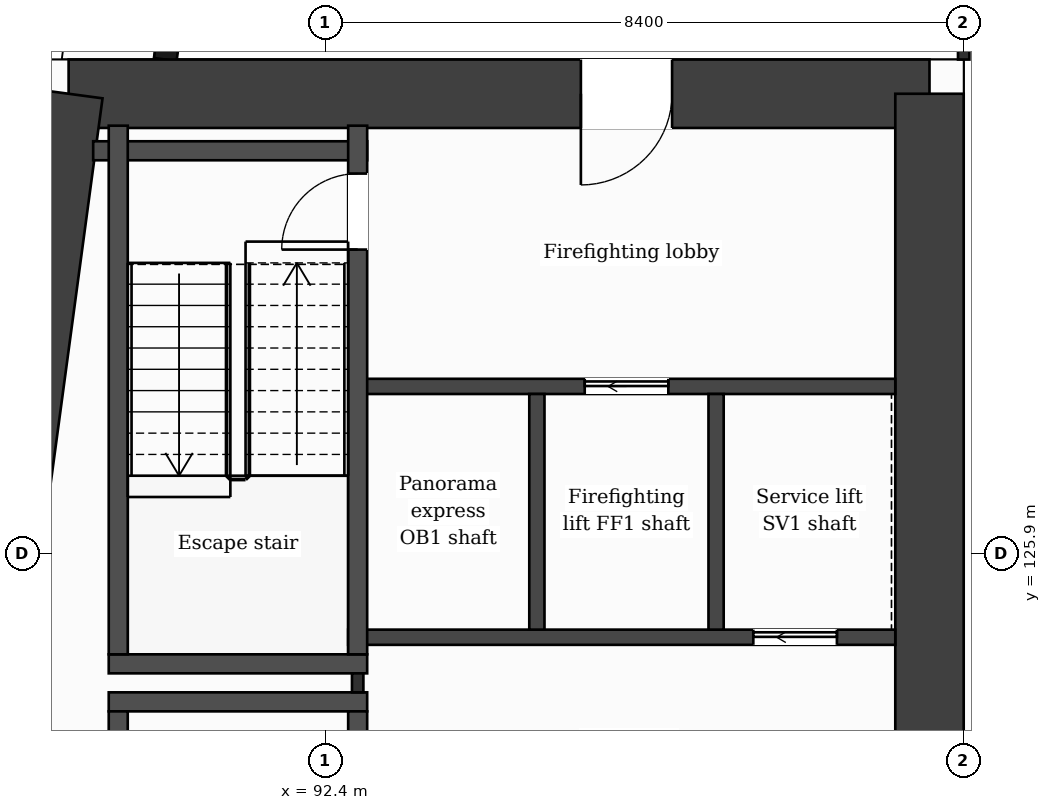
"""IFC4 building model, lengths in metres.
Left out: names, types, materials, properties, quantities, classifications, styles, units other than length and angle.
Written with IfcOpenShell. Run it as: python <this file> out.ifc"""

import sys

from ifc_helpers import new_model, si_unit, direction, frame, frame_2d, origin, place, context, subcontext, project, spatial, rectangle, extrude, element, fill, save


model = new_model("IFC4")
c1 = context("Model", 3, precision=1e-05, world=origin(), true_north=direction((0.0, 1.0)))
c2 = subcontext(c1, "Body", "Model", "MODEL_VIEW")
j1 = project(units=[si_unit("LENGTHUNIT", "METRE"), si_unit("PLANEANGLEUNIT", "RADIAN")], contexts=[c1])
p1 = place(None, origin())
s1 = spatial("IfcSite", under=j1, at=p1, CompositionType="ELEMENT")
p2 = place(p1, origin())
s2 = spatial("IfcBuilding", under=s1, at=p2, CompositionType="ELEMENT")
p3 = place(p2, frame((0.0, 0.0, 162.6)))
s3 = spatial("IfcBuildingStorey", under=s2, at=p3, CompositionType="ELEMENT", Elevation=162.6)
p4 = place(p3, frame((89.024, 131.95, 0.0), z_axis=(0.0, 0.0, 1.0), x_axis=(1.0, 0.0, 0.0)))
e1 = element("IfcWall", 1, at=p4, inside=s3, PredefinedType="SHEAR", context=c2, shape_type="SweptSolid", body=[
    extrude(rectangle(XDim=11.326, YDim=0.9, at=frame_2d((5.663, 0.0))), origin(), (0.0, 0.0, 1.0), 3.7),
])
p5 = place(p4, frame((6.739, 0.0, 0.0)))
e2 = element("IfcOpeningElement", 2, at=p5, cuts=e1, PredefinedType="OPENING", context=c2, shape_type="SweptSolid", body=[
    extrude(rectangle(XDim=1.2, YDim=2.1, at=frame_2d((0.6, 1.05))), frame((0.0, 0.46, 0.0), z_axis=(0.0, -1.0, 0.0), x_axis=(1.0, 0.0, 0.0)), (0.0, 0.0, 1.0), 0.92),
])
p6 = place(p3, frame((100.35, 131.95, 0.0), z_axis=(0.0, 0.0, 1.0), x_axis=(0.0, -1.0, 0.0)))
e3 = element("IfcWall", 3, at=p6, inside=s3, PredefinedType="SHEAR", context=c2, shape_type="SweptSolid", body=[
    extrude(rectangle(XDim=21.1, YDim=0.9, at=frame_2d((10.55, 0.0))), origin(), (0.0, 0.0, 1.0), 3.7),
])
p7 = place(p3, frame((86.184, 110.85, 0.0), z_axis=(0.0, 0.0, 1.0), x_axis=(0.133410495943, 0.991060865725, 0.0)))
e4 = element("IfcWall", 4, at=p7, inside=s3, PredefinedType="SHEAR", context=c2, shape_type="SweptSolid", body=[
    extrude(rectangle(XDim=21.29, YDim=0.9, at=frame_2d((10.645, 0.0))), origin(), (0.0, 0.0, 1.0), 3.7),
])
p8 = place(p3, frame((91.177, 138.95, 0.0), z_axis=(0.0, 0.0, 1.0), x_axis=(-0.133426664613, -0.991058689065, 0.0)))
e5 = element("IfcWall", 5, at=p8, inside=s3, PredefinedType="SOLIDWALL", context=c2, shape_type="SweptSolid", body=[
    extrude(rectangle(XDim=6.609, YDim=0.3, at=frame_2d((3.305, 0.0))), origin(), (0.0, 0.0, 1.0), 3.38),
])
p9 = place(p8, frame((1.039, 0.0, 0.9)))
e6 = element("IfcOpeningElement", 6, at=p9, cuts=e5, PredefinedType="OPENING", context=c2, shape_type="SweptSolid", body=[
    extrude(rectangle(XDim=1.2, YDim=2.1, at=frame_2d((0.6, 1.05))), frame((0.0, 0.16, 0.0), z_axis=(0.0, -1.0, 0.0), x_axis=(1.0, 0.0, 0.0)), (0.0, 0.0, 1.0), 0.32),
])
p10 = place(p8, frame((4.294, 0.0, 0.0)))
e7 = element("IfcOpeningElement", 7, at=p10, cuts=e5, PredefinedType="OPENING", context=c2, shape_type="SweptSolid", body=[
    extrude(rectangle(XDim=1.2, YDim=2.4, at=frame_2d((0.6, 1.2))), frame((0.0, 0.16, 0.0), z_axis=(0.0, -1.0, 0.0), x_axis=(1.0, 0.0, 0.0)), (0.0, 0.0, 1.0), 0.32),
])
for number, where, z_axis, x_axis in (
    (8, (89.552, 123.95, 0.0), (0.0, 0.0, 1.0), (1.0, 0.0, 0.0)),
    (9, (89.552, 124.45, 0.0), (0.0, 0.0, 1.0), (1.0, 0.0, 0.0)),
):
    element("IfcWall", number, at=place(p3, frame(where, z_axis=z_axis, x_axis=x_axis)), inside=s3, PredefinedType="PARTITIONING", context=c2, shape_type="SweptSolid", body=[
        extrude(rectangle(XDim=3.4, YDim=0.25, at=frame_2d((1.7, 0.0))), origin(), (0.0, 0.0, 1.0), 3.38),
    ])
p11 = place(p3, frame((92.702, 124.8, 0.0), z_axis=(0.0, 0.0, 1.0), x_axis=(1.0, 0.0, 0.0)))
e10 = element("IfcWall", 10, at=p11, inside=s3, PredefinedType="PARTITIONING", context=c2, shape_type="SweptSolid", body=[
    extrude(rectangle(XDim=7.198, YDim=0.2, at=frame_2d((3.599, 0.0))), origin(), (0.0, 0.0, 1.0), 3.38),
])
p12 = place(p11, frame((5.33, 0.0, 0.0)))
e11 = element("IfcOpeningElement", 11, at=p12, cuts=e10, PredefinedType="OPENING", context=c2, shape_type="SweptSolid", body=[
    extrude(rectangle(XDim=1.1, YDim=2.1, at=frame_2d((0.55, 1.05))), frame((0.0, 0.11, 0.0), z_axis=(0.0, -1.0, 0.0), x_axis=(1.0, 0.0, 0.0)), (0.0, 0.0, 1.0), 0.22),
])
p13 = place(p3, frame((92.827, 128.1, 0.0), z_axis=(0.0, 0.0, 1.0), x_axis=(1.0, 0.0, 0.0)))
e12 = element("IfcWall", 12, at=p13, inside=s3, PredefinedType="PARTITIONING", context=c2, shape_type="SweptSolid", body=[
    extrude(rectangle(XDim=7.073, YDim=0.2, at=frame_2d((3.537, 0.0))), origin(), (0.0, 0.0, 1.0), 3.38),
])
p14 = place(p13, frame((2.987, 0.0, 0.0)))
e13 = element("IfcOpeningElement", 13, at=p14, cuts=e12, PredefinedType="OPENING", context=c2, shape_type="SweptSolid", body=[
    extrude(rectangle(XDim=1.1, YDim=2.1, at=frame_2d((0.55, 1.05))), frame((0.0, 0.11, 0.0), z_axis=(0.0, -1.0, 0.0), x_axis=(1.0, 0.0, 0.0)), (0.0, 0.0, 1.0), 0.22),
])
p15 = place(p3, frame((89.347, 131.2, 0.0), z_axis=(0.0, 0.0, 1.0), x_axis=(1.0, 0.0, 0.0)))
e14 = element("IfcWall", 14, at=p15, inside=s3, PredefinedType="PARTITIONING", context=c2, shape_type="SweptSolid", body=[
    extrude(rectangle(XDim=3.604, YDim=0.25, at=frame_2d((1.802, 0.0))), origin(), (0.0, 0.0, 1.0), 3.38),
])
p16 = place(p3, frame((89.677, 116.87, 0.0), z_axis=(0.0, 0.0, 1.0), x_axis=(0.0, 1.0, 0.0)))
e15 = element("IfcWall", 15, at=p16, inside=s3, PredefinedType="PARTITIONING", context=c2, shape_type="SweptSolid", body=[
    extrude(rectangle(XDim=6.955, YDim=0.25, at=frame_2d((3.478, 0.0))), origin(), (0.0, 0.0, 1.0), 3.38),
])
p17 = place(p3, frame((89.677, 124.575, 0.0), z_axis=(0.0, 0.0, 1.0), x_axis=(0.0, 1.0, 0.0)))
e16 = element("IfcWall", 16, at=p17, inside=s3, PredefinedType="PARTITIONING", context=c2, shape_type="SweptSolid", body=[
    extrude(rectangle(XDim=6.955, YDim=0.25, at=frame_2d((3.478, 0.0))), origin(), (0.0, 0.0, 1.0), 3.38),
])
p18 = place(p3, frame((92.827, 124.075, 0.0), z_axis=(0.0, 0.0, 1.0), x_axis=(0.0, 1.0, 0.0)))
e17 = element("IfcWall", 17, at=p18, inside=s3, PredefinedType="PARTITIONING", context=c2, shape_type="SweptSolid", body=[
    extrude(rectangle(XDim=0.25, YDim=0.15, at=frame_2d((0.125, 0.0))), origin(), (0.0, 0.0, 1.0), 3.38),
])
p19 = place(p3, frame((92.827, 116.87, 0.0), z_axis=(0.0, 0.0, 1.0), x_axis=(0.0, 1.0, 0.0)))
e18 = element("IfcWall", 18, at=p19, inside=s3, PredefinedType="PARTITIONING", context=c2, shape_type="SweptSolid", body=[
    extrude(rectangle(XDim=6.955, YDim=0.25, at=frame_2d((3.478, 0.0))), origin(), (0.0, 0.0, 1.0), 3.38),
])
p20 = place(p19, frame((5.655, 0.0, 0.0)))
e19 = element("IfcOpeningElement", 19, at=p20, cuts=e18, PredefinedType="OPENING", context=c2, shape_type="SweptSolid", body=[
    extrude(rectangle(XDim=0.95, YDim=2.1, at=frame_2d((0.475, 1.05))), frame((0.0, 0.135, 0.0), z_axis=(0.0, -1.0, 0.0), x_axis=(1.0, 0.0, 0.0)), (0.0, 0.0, 1.0), 0.27),
])
p21 = place(p3, frame((92.827, 124.575, 0.0), z_axis=(0.0, 0.0, 1.0), x_axis=(0.0, 1.0, 0.0)))
e20 = element("IfcWall", 20, at=p21, inside=s3, PredefinedType="PARTITIONING", context=c2, shape_type="SweptSolid", body=[
    extrude(rectangle(XDim=6.955, YDim=0.25, at=frame_2d((3.478, 0.0))), origin(), (0.0, 0.0, 1.0), 3.38),
])
p22 = place(p21, frame((5.325, 0.0, 0.0)))
e21 = element("IfcOpeningElement", 21, at=p22, cuts=e20, PredefinedType="OPENING", context=c2, shape_type="SweptSolid", body=[
    extrude(rectangle(XDim=1.0, YDim=2.1, at=frame_2d((0.5, 1.05))), frame((0.0, 0.135, 0.0), z_axis=(0.0, -1.0, 0.0), x_axis=(1.0, 0.0, 0.0)), (0.0, 0.0, 1.0), 0.27),
])
for number, where, z_axis, x_axis in (
    (22, (95.185, 124.9, 0.0), (0.0, 0.0, 1.0), (0.0, 1.0, 0.0)),
    (23, (97.542, 124.9, 0.0), (0.0, 0.0, 1.0), (0.0, 1.0, 0.0)),
):
    element("IfcWall", number, at=place(p3, frame(where, z_axis=z_axis, x_axis=x_axis)), inside=s3, PredefinedType="PARTITIONING", context=c2, shape_type="SweptSolid", body=[
        extrude(rectangle(XDim=3.1, YDim=0.2, at=frame_2d((1.55, 0.0))), origin(), (0.0, 0.0, 1.0), 3.38),
    ])
p23 = place(p3, frame((100.8, 132.4, 0.0), z_axis=(0.0, 0.0, 1.0), x_axis=(0.0, 1.0, 0.0)))
e24 = element("IfcWall", 24, at=p23, inside=s3, PredefinedType="PARTITIONING", context=c2, shape_type="SweptSolid", body=[
    extrude(rectangle(XDim=1.325, YDim=0.15, at=frame_2d((0.663, 0.0))), origin(), (0.0, 0.0, 1.0), 3.38),
])
p24 = place(p14, origin())
e25 = element("IfcDoor", 25, at=p24, inside=s3, OperationType="SLIDING_TO_LEFT", PredefinedType="DOOR", context=c2, shape_type="SweptSolid", body=[
    extrude(rectangle(XDim=1.1, YDim=2.1, at=frame_2d((0.55, 1.05))), frame((0.0, 0.025, 0.0), z_axis=(0.0, -1.0, 0.0), x_axis=(1.0, 0.0, 0.0)), (0.0, 0.0, 1.0), 0.05),
])
fill(e13, e25)
p25 = place(p12, origin())
e26 = element("IfcDoor", 26, at=p25, inside=s3, OperationType="SLIDING_TO_LEFT", PredefinedType="DOOR", context=c2, shape_type="SweptSolid", body=[
    extrude(rectangle(XDim=1.1, YDim=2.1, at=frame_2d((0.55, 1.05))), frame((0.0, 0.025, 0.0), z_axis=(0.0, -1.0, 0.0), x_axis=(1.0, 0.0, 0.0)), (0.0, 0.0, 1.0), 0.05),
])
fill(e11, e26)
p26 = place(p22, origin())
e27 = element("IfcDoor", 27, at=p26, inside=s3, OperationType="SINGLE_SWING_LEFT", PredefinedType="DOOR", context=c2, shape_type="SweptSolid", body=[
    extrude(rectangle(XDim=1.0, YDim=2.1, at=frame_2d((0.5, 1.05))), frame((0.0, 0.025, 0.0), z_axis=(0.0, -1.0, 0.0), x_axis=(1.0, 0.0, 0.0)), (0.0, 0.0, 1.0), 0.05),
])
fill(e21, e27)
p27 = place(p5, origin())
e28 = element("IfcDoor", 28, at=p27, inside=s3, OperationType="SINGLE_SWING_LEFT", PredefinedType="DOOR", context=c2, shape_type="SweptSolid", body=[
    extrude(rectangle(XDim=1.2, YDim=2.1, at=frame_2d((0.6, 1.05))), frame((0.0, 0.025, 0.0), z_axis=(0.0, -1.0, 0.0), x_axis=(1.0, 0.0, 0.0)), (0.0, 0.0, 1.0), 0.05),
])
fill(e2, e28)
save(model, sys.argv[1])
